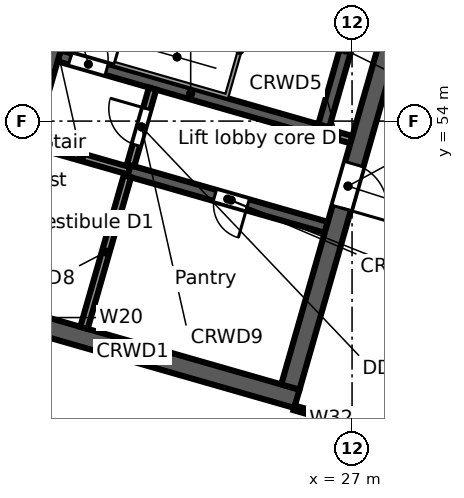
"""IFC4 building model, lengths in metres.
Left out: names, types, materials, properties, quantities, classifications, styles, units other than length and angle.
Written with IfcOpenShell. Run it as: python <this file> out.ifc"""

import sys

from ifc_helpers import new_model, si_unit, direction, frame, frame_2d, origin, place, context, subcontext, project, spatial, rectangle, extrude, element, fill, save


model = new_model("IFC4")
c1 = context("Model", 3, precision=1e-05, world=origin(), true_north=direction((0.0, 1.0)))
c2 = subcontext(c1, "Body", "Model", "MODEL_VIEW")
j1 = project(units=[si_unit("LENGTHUNIT", "METRE"), si_unit("PLANEANGLEUNIT", "RADIAN")], contexts=[c1])
p1 = place(None, origin())
s1 = spatial("IfcSite", under=j1, at=p1, CompositionType="ELEMENT")
p2 = place(p1, origin())
s2 = spatial("IfcBuilding", under=s1, at=p2, CompositionType="ELEMENT")
p3 = place(p2, frame((0.0, 0.0, 166.9)))
s3 = spatial("IfcBuildingStorey", under=s2, at=p3, CompositionType="ELEMENT", Elevation=166.9)
p4 = place(p3, frame((24.042, 41.106, 0.0), z_axis=(0.0, 0.0, 1.0), x_axis=(-0.961261693976, 0.275637362661, 0.0)))
e1 = element("IfcWall", 1, at=p4, inside=s3, PredefinedType="STANDARD", context=c2, shape_type="SweptSolid", body=[
    extrude(rectangle(XDim=24.948, YDim=0.3, at=frame_2d((12.474, 0.0))), origin(), (0.0, 0.0, 1.0), 3.68),
])
p5 = place(p4, frame((21.441, 0.0, 0.6)))
e2 = element("IfcOpeningElement", 2, at=p5, cuts=e1, PredefinedType="OPENING", context=c2, shape_type="SweptSolid", body=[
    extrude(rectangle(XDim=0.9, YDim=2.4, at=frame_2d((0.45, 1.2))), frame((0.0, 0.16, 0.0), z_axis=(0.0, -1.0, 0.0), x_axis=(1.0, 0.0, 0.0)), (0.0, 0.0, 1.0), 0.32),
])
p6 = place(p4, frame((13.121, 0.0, 0.6)))
e3 = element("IfcOpeningElement", 3, at=p6, cuts=e1, PredefinedType="OPENING", context=c2, shape_type="SweptSolid", body=[
    extrude(rectangle(XDim=0.9, YDim=2.4, at=frame_2d((0.45, 1.2))), frame((0.0, 0.16, 0.0), z_axis=(0.0, -1.0, 0.0), x_axis=(1.0, 0.0, 0.0)), (0.0, 0.0, 1.0), 0.32),
])
p7 = place(p4, frame((10.591, 0.0, 0.0)))
e4 = element("IfcOpeningElement", 4, at=p7, cuts=e1, PredefinedType="OPENING", context=c2, shape_type="SweptSolid", body=[
    extrude(rectangle(XDim=1.8, YDim=2.4, at=frame_2d((0.9, 1.2))), frame((0.0, 0.16, 0.0), z_axis=(0.0, -1.0, 0.0), x_axis=(1.0, 0.0, 0.0)), (0.0, 0.0, 1.0), 0.32),
])
p8 = place(p4, frame((4.8, 0.0, 0.6)))
e5 = element("IfcOpeningElement", 5, at=p8, cuts=e1, PredefinedType="OPENING", context=c2, shape_type="SweptSolid", body=[
    extrude(rectangle(XDim=0.9, YDim=2.4, at=frame_2d((0.45, 1.2))), frame((0.0, 0.16, 0.0), z_axis=(0.0, -1.0, 0.0), x_axis=(1.0, 0.0, 0.0)), (0.0, 0.0, 1.0), 0.32),
])
p9 = place(p4, frame((2.27, 0.0, 0.0)))
e6 = element("IfcOpeningElement", 6, at=p9, cuts=e1, PredefinedType="OPENING", context=c2, shape_type="SweptSolid", body=[
    extrude(rectangle(XDim=1.8, YDim=2.4, at=frame_2d((0.9, 1.2))), frame((0.0, 0.16, 0.0), z_axis=(0.0, -1.0, 0.0), x_axis=(1.0, 0.0, 0.0)), (0.0, 0.0, 1.0), 0.32),
])
p10 = place(p3, frame((37.399, 59.851, 0.0), z_axis=(0.0, 0.0, 1.0), x_axis=(-0.529919986982, -0.848047644532, 0.0)))
e7 = element("IfcWall", 7, at=p10, inside=s3, PredefinedType="STANDARD", context=c2, shape_type="SweptSolid", body=[
    extrude(rectangle(XDim=21.125, YDim=0.3, at=frame_2d((10.562, 0.0))), origin(), (0.0, 0.0, 1.0), 3.68),
])
p11 = place(p10, frame((16.687, 0.0, 0.6)))
e8 = element("IfcOpeningElement", 8, at=p11, cuts=e7, PredefinedType="OPENING", context=c2, shape_type="SweptSolid", body=[
    extrude(rectangle(XDim=0.9, YDim=2.4, at=frame_2d((0.45, 1.2))), frame((0.0, 0.16, 0.0), z_axis=(0.0, -1.0, 0.0), x_axis=(1.0, 0.0, 0.0)), (0.0, 0.0, 1.0), 0.32),
])
p12 = place(p10, frame((6.187, 0.0, 0.6)))
e9 = element("IfcOpeningElement", 9, at=p12, cuts=e7, PredefinedType="OPENING", context=c2, shape_type="SweptSolid", body=[
    extrude(rectangle(XDim=0.9, YDim=2.4, at=frame_2d((0.45, 1.2))), frame((0.0, 0.16, 0.0), z_axis=(0.0, -1.0, 0.0), x_axis=(1.0, 0.0, 0.0)), (0.0, 0.0, 1.0), 0.32),
])
p13 = place(p3, frame((16.897, 49.173, 0.0), z_axis=(0.0, 0.0, 1.0), x_axis=(0.96126248289, -0.275634611374, 0.0)))
e10 = element("IfcWall", 10, at=p13, inside=s3, PredefinedType="SOLIDWALL", context=c2, shape_type="SweptSolid", body=[
    extrude(rectangle(XDim=9.0, YDim=0.5, at=frame_2d((4.5, 0.0))), origin(), (0.0, 0.0, 1.0), 3.68),
])
p14 = place(p3, frame((18.632, 53.409, 0.0), z_axis=(0.0, 0.0, 1.0), x_axis=(0.961247078216, -0.275688328772, 0.0)))
e11 = element("IfcWall", 11, at=p14, inside=s3, PredefinedType="SOLIDWALL", context=c2, shape_type="SweptSolid", body=[
    extrude(rectangle(XDim=2.6, YDim=0.2, at=frame_2d((1.3, 0.0))), origin(), (0.0, 0.0, 1.0), 3.68),
])
p15 = place(p3, frame((21.131, 52.692, 0.0), z_axis=(0.0, 0.0, 1.0), x_axis=(0.961271043721, -0.27560475414, 0.0)))
e12 = element("IfcWall", 12, at=p15, inside=s3, PredefinedType="SOLIDWALL", context=c2, shape_type="SweptSolid", body=[
    extrude(rectangle(XDim=5.4, YDim=0.3, at=frame_2d((2.7, 0.0))), origin(), (0.0, 0.0, 1.0), 3.68),
])
p16 = place(p15, frame((2.35, 0.0, 0.0)))
e13 = element("IfcOpeningElement", 13, at=p16, cuts=e12, PredefinedType="OPENING", context=c2, shape_type="SweptSolid", body=[
    extrude(rectangle(XDim=0.9, YDim=2.1, at=frame_2d((0.45, 1.05))), frame((0.0, 0.16, 0.0), z_axis=(0.0, -1.0, 0.0), x_axis=(1.0, 0.0, 0.0)), (0.0, 0.0, 1.0), 0.32),
])
p17 = place(p3, frame((19.293, 55.716, 0.0), z_axis=(0.0, 0.0, 1.0), x_axis=(0.96125862491, -0.275648065539, 0.0)))
e14 = element("IfcWall", 14, at=p17, inside=s3, PredefinedType="SOLIDWALL", context=c2, shape_type="SweptSolid", body=[
    extrude(rectangle(XDim=7.2, YDim=0.3, at=frame_2d((3.6, 0.0))), origin(), (0.0, 0.0, 1.0), 3.68),
])
p18 = place(p17, frame((0.3, 0.0, 0.0)))
e15 = element("IfcOpeningElement", 15, at=p18, cuts=e14, PredefinedType="OPENING", context=c2, shape_type="SweptSolid", body=[
    extrude(rectangle(XDim=1.0, YDim=2.1, at=frame_2d((0.5, 1.05))), frame((0.0, 0.16, 0.0), z_axis=(0.0, -1.0, 0.0), x_axis=(1.0, 0.0, 0.0)), (0.0, 0.0, 1.0), 0.32),
])
p19 = place(p3, frame((26.214, 53.732, 0.0), z_axis=(0.0, 0.0, 1.0), x_axis=(0.961200870072, -0.275849392554, 0.0)))
e16 = element("IfcWall", 16, at=p19, inside=s3, PredefinedType="SOLIDWALL", context=c2, shape_type="SweptSolid", body=[
    extrude(rectangle(XDim=0.8, YDim=0.2, at=frame_2d((0.4, 0.0))), origin(), (0.0, 0.0, 1.0), 3.68),
])
p20 = place(p3, frame((17.206, 49.344, 0.0), z_axis=(0.0, 0.0, 1.0), x_axis=(0.275632651182, 0.961263044958, 0.0)))
e17 = element("IfcWall", 17, at=p20, inside=s3, PredefinedType="SOLIDWALL", context=c2, shape_type="SweptSolid", body=[
    extrude(rectangle(XDim=11.0, YDim=0.5, at=frame_2d((5.5, 0.0))), origin(), (0.0, 0.0, 1.0), 3.68),
])
p21 = place(p20, frame((4.9, 0.0, 0.0)))
e18 = element("IfcOpeningElement", 18, at=p21, cuts=e17, PredefinedType="OPENING", context=c2, shape_type="SweptSolid", body=[
    extrude(rectangle(XDim=1.2, YDim=2.1, at=frame_2d((0.6, 1.05))), frame((0.0, 0.26, 0.0), z_axis=(0.0, -1.0, 0.0), x_axis=(1.0, 0.0, 0.0)), (0.0, 0.0, 1.0), 0.52),
])
p22 = place(p3, frame((19.946, 48.559, 0.0), z_axis=(0.0, 0.0, 1.0), x_axis=(0.275668905258, 0.961252648721, 0.0)))
e19 = element("IfcWall", 19, at=p22, inside=s3, PredefinedType="SOLIDWALL", context=c2, shape_type="SweptSolid", body=[
    extrude(rectangle(XDim=4.15, YDim=0.2, at=frame_2d((2.075, 0.0))), origin(), (0.0, 0.0, 1.0), 3.68),
])
p23 = place(p3, frame((21.172, 52.837, 0.0), z_axis=(0.0, 0.0, 1.0), x_axis=(0.275657676022, 0.961255868981, 0.0)))
e20 = element("IfcWall", 20, at=p23, inside=s3, PredefinedType="PARTITIONING", context=c2, shape_type="SweptSolid", body=[
    extrude(rectangle(XDim=2.1, YDim=0.2, at=frame_2d((1.05, 0.0))), origin(), (0.0, 0.0, 1.0), 3.68),
])
p24 = place(p23, frame((0.55, 0.0, 0.0)))
e21 = element("IfcOpeningElement", 21, at=p24, cuts=e20, PredefinedType="OPENING", context=c2, shape_type="SweptSolid", body=[
    extrude(rectangle(XDim=1.0, YDim=2.1, at=frame_2d((0.5, 1.05))), frame((0.0, 0.11, 0.0), z_axis=(0.0, -1.0, 0.0), x_axis=(1.0, 0.0, 0.0)), (0.0, 0.0, 1.0), 0.22),
])
p25 = place(p3, frame((26.256, 53.876, 0.0), z_axis=(0.0, 0.0, 1.0), x_axis=(0.275614546295, 0.961268236171, 0.0)))
e22 = element("IfcWall", 22, at=p25, inside=s3, PredefinedType="SOLIDWALL", context=c2, shape_type="SweptSolid", body=[
    extrude(rectangle(XDim=4.15, YDim=0.3, at=frame_2d((2.075, 0.0))), origin(), (0.0, 0.0, 1.0), 3.68),
])
p26 = place(p3, frame((25.377, 47.002, 0.0), z_axis=(0.0, 0.0, 1.0), x_axis=(0.275632651182, 0.961263044958, 0.0)))
e23 = element("IfcWall", 23, at=p26, inside=s3, PredefinedType="SOLIDWALL", context=c2, shape_type="SweptSolid", body=[
    extrude(rectangle(XDim=11.0, YDim=0.5, at=frame_2d((5.5, 0.0))), origin(), (0.0, 0.0, 1.0), 3.68),
])
p27 = place(p26, frame((4.9, 0.0, 0.0)))
e24 = element("IfcOpeningElement", 24, at=p27, cuts=e23, PredefinedType="OPENING", context=c2, shape_type="SweptSolid", body=[
    extrude(rectangle(XDim=1.2, YDim=2.1, at=frame_2d((0.6, 1.05))), frame((0.0, 0.26, 0.0), z_axis=(0.0, -1.0, 0.0), x_axis=(1.0, 0.0, 0.0)), (0.0, 0.0, 1.0), 0.52),
])
p28 = place(p3, frame((25.479, 46.452, 0.0), z_axis=(0.0, 0.0, 1.0), x_axis=(0.961245725795, -0.275693044238, 0.0)))
e25 = element("IfcWall", 25, at=p28, inside=s3, PredefinedType="PARTITIONING", context=c2, shape_type="SweptSolid", body=[
    extrude(rectangle(XDim=2.023, YDim=0.125, at=frame_2d((1.012, 0.0))), origin(), (0.0, 0.0, 1.0), 2.952),
])
p29 = place(p18, origin())
e26 = element("IfcDoor", 26, at=p29, inside=s3, OperationType="SINGLE_SWING_LEFT", PredefinedType="DOOR", context=c2, shape_type="SweptSolid", body=[
    extrude(rectangle(XDim=1.0, YDim=2.1, at=frame_2d((0.5, 1.05))), frame((0.0, 0.025, 0.0), z_axis=(0.0, -1.0, 0.0), x_axis=(1.0, 0.0, 0.0)), (0.0, 0.0, 1.0), 0.05),
])
fill(e15, e26)
p30 = place(p24, origin())
e27 = element("IfcDoor", 27, at=p30, inside=s3, OperationType="SINGLE_SWING_RIGHT", PredefinedType="DOOR", context=c2, shape_type="SweptSolid", body=[
    extrude(rectangle(XDim=1.0, YDim=2.1, at=frame_2d((0.5, 1.05))), frame((0.0, 0.025, 0.0), z_axis=(0.0, -1.0, 0.0), x_axis=(1.0, 0.0, 0.0)), (0.0, 0.0, 1.0), 0.05),
])
fill(e21, e27)
p31 = place(p27, frame((1.2, 0.0, 0.0), z_axis=(0.0, 0.0, 1.0), x_axis=(-1.0, 0.0, 0.0)))
e28 = element("IfcDoor", 28, at=p31, inside=s3, OperationType="SINGLE_SWING_RIGHT", PredefinedType="DOOR", context=c2, shape_type="SweptSolid", body=[
    extrude(rectangle(XDim=1.2, YDim=2.1, at=frame_2d((0.6, 1.05))), frame((0.0, 0.025, 0.0), z_axis=(0.0, -1.0, 0.0), x_axis=(1.0, 0.0, 0.0)), (0.0, 0.0, 1.0), 0.05),
])
fill(e24, e28)
p32 = place(p16, frame((0.9, 0.0, 0.0), z_axis=(0.0, 0.0, 1.0), x_axis=(-1.0, 0.0, 0.0)))
e29 = element("IfcDoor", 29, at=p32, inside=s3, OperationType="SINGLE_SWING_LEFT", PredefinedType="DOOR", context=c2, shape_type="SweptSolid", body=[
    extrude(rectangle(XDim=0.9, YDim=2.1, at=frame_2d((0.45, 1.05))), frame((0.0, 0.025, 0.0), z_axis=(0.0, -1.0, 0.0), x_axis=(1.0, 0.0, 0.0)), (0.0, 0.0, 1.0), 0.05),
])
fill(e13, e29)
save(model, sys.argv[1])
